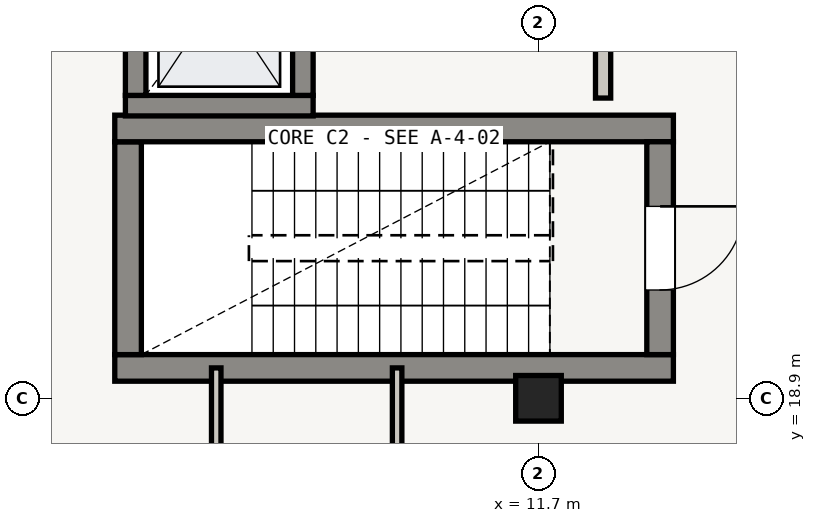
"""IFC4 building model, lengths in metres.
Left out: names, types, materials, properties, quantities, classifications, styles, units other than length and angle.
Written with IfcOpenShell. Run it as: python <this file> out.ifc"""

import sys

from ifc_helpers import new_model, si_unit, direction, frame, frame_2d, origin, origin_2d, place, context, subcontext, project, spatial, rectangle, extrude, element, fill, save


model = new_model("IFC4")
c1 = context("Model", 3, precision=1e-05, world=origin(), true_north=direction((0.0, 1.0)))
c2 = subcontext(c1, "Body", "Model", "MODEL_VIEW")
j1 = project(units=[si_unit("LENGTHUNIT", "METRE"), si_unit("PLANEANGLEUNIT", "RADIAN")], contexts=[c1])
p1 = place(None, origin())
s1 = spatial("IfcSite", under=j1, at=p1, CompositionType="ELEMENT")
p2 = place(p1, origin())
s2 = spatial("IfcBuilding", under=s1, at=p2, CompositionType="ELEMENT")
p3 = place(p2, origin())
s3 = spatial("IfcBuildingStorey", under=s2, at=p3, CompositionType="ELEMENT", Elevation=0.0)
p4 = place(p3, frame((11.7, 18.9, 0.0), z_axis=(0.0, 0.0, 1.0), x_axis=(1.0, 0.0, 0.0)))
e1 = element("IfcColumn", 1, at=p4, inside=s3, PredefinedType="COLUMN", context=c2, shape_type="SweptSolid", body=[
    extrude(rectangle(XDim=0.6, YDim=0.6, at=origin_2d()), origin(), (0.0, 0.0, 1.0), 4.22),
])
p5 = place(p3, frame((13.475, 19.3, 0.0), z_axis=(0.0, 0.0, 1.0), x_axis=(-1.0, 0.0, 0.0)))
e2 = element("IfcWall", 2, at=p5, inside=s3, PredefinedType="SHEAR", context=c2, shape_type="SweptSolid", body=[
    extrude(rectangle(XDim=7.35, YDim=0.35, at=frame_2d((3.675, 0.0))), origin(), (0.0, 0.0, 1.0), 4.22),
])
p6 = place(p3, frame((6.3, 19.475, 0.0), z_axis=(0.0, 0.0, 1.0), x_axis=(0.0, 1.0, 0.0)))
e3 = element("IfcWall", 3, at=p6, inside=s3, PredefinedType="SHEAR", context=c2, shape_type="SweptSolid", body=[
    extrude(rectangle(XDim=2.8, YDim=0.35, at=frame_2d((1.4, 0.0))), origin(), (0.0, 0.0, 1.0), 4.22),
])
p7 = place(p3, frame((6.125, 22.45, 0.0), z_axis=(0.0, 0.0, 1.0), x_axis=(1.0, 0.0, 0.0)))
e4 = element("IfcWall", 4, at=p7, inside=s3, PredefinedType="SHEAR", context=c2, shape_type="SweptSolid", body=[
    extrude(rectangle(XDim=7.35, YDim=0.35, at=frame_2d((3.675, 0.0))), origin(), (0.0, 0.0, 1.0), 4.22),
])
p8 = place(p3, frame((13.3, 22.275, 0.0), z_axis=(0.0, 0.0, 1.0), x_axis=(0.0, -1.0, 0.0)))
e5 = element("IfcWall", 5, at=p8, inside=s3, PredefinedType="SHEAR", context=c2, shape_type="SweptSolid", body=[
    extrude(rectangle(XDim=2.8, YDim=0.35, at=frame_2d((1.4, 0.0))), origin(), (0.0, 0.0, 1.0), 4.22),
])
p9 = place(p8, frame((0.85, 0.0, 0.0)))
e6 = element("IfcOpeningElement", 6, at=p9, cuts=e5, PredefinedType="OPENING", context=c2, shape_type="SweptSolid", body=[
    extrude(rectangle(XDim=1.1, YDim=2.05, at=frame_2d((0.55, 1.025))), frame((0.0, 0.175, 0.0), z_axis=(0.0, -1.0, 0.0), x_axis=(1.0, 0.0, 0.0)), (0.0, 0.0, 1.0), 0.35),
])
p10 = place(p3, frame((8.735, 22.75, 0.0), z_axis=(0.0, 0.0, 1.0), x_axis=(-1.0, 0.0, 0.0)))
e7 = element("IfcWall", 7, at=p10, inside=s3, PredefinedType="SHEAR", context=c2, shape_type="SweptSolid", body=[
    extrude(rectangle(XDim=2.47, YDim=0.27, at=frame_2d((1.235, 0.0))), origin(), (0.0, 0.0, 1.0), 4.22),
])
p11 = place(p3, frame((6.4, 22.885, 0.0), z_axis=(0.0, 0.0, 1.0), x_axis=(0.0, 1.0, 0.0)))
e8 = element("IfcWall", 8, at=p11, inside=s3, PredefinedType="SHEAR", context=c2, shape_type="SweptSolid", body=[
    extrude(rectangle(XDim=2.63, YDim=0.27, at=frame_2d((1.315, 0.0))), origin(), (0.0, 0.0, 1.0), 4.22),
])
p12 = place(p3, frame((8.6, 25.515, 0.0), z_axis=(0.0, 0.0, 1.0), x_axis=(0.0, -1.0, 0.0)))
e9 = element("IfcWall", 9, at=p12, inside=s3, PredefinedType="SHEAR", context=c2, shape_type="SweptSolid", body=[
    extrude(rectangle(XDim=2.63, YDim=0.27, at=frame_2d((1.315, 0.0))), origin(), (0.0, 0.0, 1.0), 4.22),
])
p13 = place(p12, frame((0.755, 0.0, 0.0)))
e10 = element("IfcOpeningElement", 10, at=p13, cuts=e9, PredefinedType="OPENING", context=c2, shape_type="SweptSolid", body=[
    extrude(rectangle(XDim=1.12, YDim=2.1, at=frame_2d((0.56, 1.05))), frame((0.0, 0.135, 0.0), z_axis=(0.0, -1.0, 0.0), x_axis=(1.0, 0.0, 0.0)), (0.0, 0.0, 1.0), 0.27),
])
p14 = place(p3, frame((12.55, 25.75, 0.0), z_axis=(0.0, 0.0, 1.0), x_axis=(0.0, -1.0, 0.0)))
e11 = element("IfcWall", 11, at=p14, inside=s3, PredefinedType="SOLIDWALL", context=c2, shape_type="SweptSolid", body=[
    extrude(rectangle(XDim=2.9, YDim=0.2, at=frame_2d((1.45, 0.0))), origin(), (0.0, 0.0, 1.0), 3.24),
])
p15 = place(p14, frame((0.875, 0.0, 0.0)))
e12 = element("IfcOpeningElement", 12, at=p15, cuts=e11, PredefinedType="OPENING", context=c2, shape_type="SweptSolid", body=[
    extrude(rectangle(XDim=1.15, YDim=2.05, at=frame_2d((0.575, 1.025))), frame((0.0, 0.1, 0.0), z_axis=(0.0, -1.0, 0.0), x_axis=(1.0, 0.0, 0.0)), (0.0, 0.0, 1.0), 0.2),
])
for number, where, z_axis, x_axis in (
    (13, (7.46, 19.3, 0.0), (0.0, 0.0, 1.0), (0.0, -1.0, 0.0)),
    (14, (9.84, 15.92, 0.0), (0.0, 0.0, 1.0), (0.0, 1.0, 0.0)),
):
    element("IfcWall", number, at=place(p3, frame(where, z_axis=z_axis, x_axis=x_axis)), inside=s3, PredefinedType="PARTITIONING", context=c2, shape_type="SweptSolid", body=[
        extrude(rectangle(XDim=3.38, YDim=0.125, at=frame_2d((1.69, 0.0))), origin(), (0.0, 0.0, 1.0), 3.24),
    ])
p16 = place(p9, origin())
e15 = element("IfcDoor", 15, at=p16, inside=s3, OperationType="SINGLE_SWING_LEFT", PredefinedType="DOOR", context=c2, shape_type="SweptSolid", body=[
    extrude(rectangle(XDim=1.1, YDim=2.05, at=frame_2d((0.55, 1.025))), frame((0.0, 0.025, 0.0), z_axis=(0.0, -1.0, 0.0), x_axis=(1.0, 0.0, 0.0)), (0.0, 0.0, 1.0), 0.05),
])
fill(e6, e15)
save(model, sys.argv[1])
